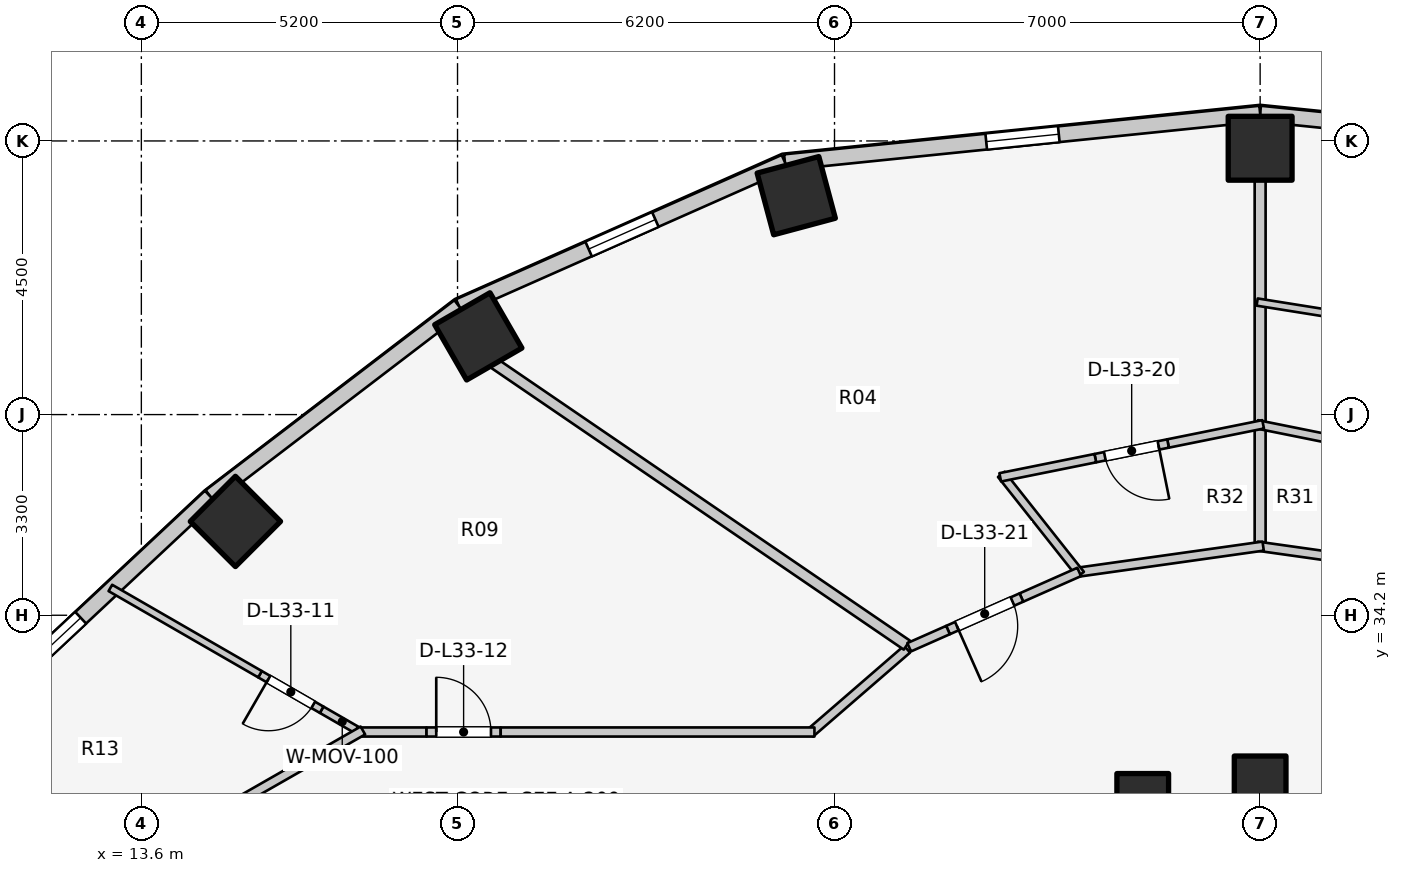
"""IFC4 building model, lengths in metres.
Left out: names, types, materials, properties, quantities, classifications, styles, units other than length and angle.
Written with IfcOpenShell. Run it as: python <this file> out.ifc"""

import sys

from ifc_helpers import new_model, si_unit, direction, frame, frame_2d, origin, origin_2d, place, context, subcontext, project, spatial, rectangle, extrude, element, fill, save


model = new_model("IFC4")
c1 = context("Model", 3, precision=1e-05, world=origin(), true_north=direction((0.0, 1.0)))
c2 = subcontext(c1, "Body", "Model", "MODEL_VIEW")
j1 = project(units=[si_unit("LENGTHUNIT", "METRE"), si_unit("PLANEANGLEUNIT", "RADIAN")], contexts=[c1])
p1 = place(None, origin())
s1 = spatial("IfcSite", under=j1, at=p1, CompositionType="ELEMENT")
p2 = place(p1, origin())
s2 = spatial("IfcBuilding", under=s1, at=p2, CompositionType="ELEMENT")
p3 = place(p2, frame((0.0, 0.0, 110.4)))
s3 = spatial("IfcBuildingStorey", under=s2, at=p3, CompositionType="ELEMENT", Elevation=110.4)
p4 = place(p3, frame((32.0, 31.46, 0.0), z_axis=(0.0, 0.0, 1.0), x_axis=(1.0, 0.0, 0.0)))
e1 = element("IfcColumn", 1, at=p4, inside=s3, PredefinedType="COLUMN", context=c2, shape_type="SweptSolid", body=[
    extrude(rectangle(XDim=0.85, YDim=0.85, at=origin_2d()), origin(), (0.0, 0.0, 1.0), 3.1),
])
p5 = place(p3, frame((32.0, 41.88, 0.0), z_axis=(0.0, 0.0, 1.0), x_axis=(0.0, 1.0, 0.0)))
e2 = element("IfcColumn", 2, at=p5, inside=s3, PredefinedType="COLUMN", context=c2, shape_type="SweptSolid", body=[
    extrude(rectangle(XDim=1.05, YDim=1.05, at=origin_2d()), origin(), (0.0, 0.0, 1.0), 3.1),
])
p6 = place(p3, frame((30.069, 31.172, 0.0), z_axis=(0.0, 0.0, 1.0), x_axis=(1.0, 0.0, 0.0)))
e3 = element("IfcColumn", 3, at=p6, inside=s3, PredefinedType="COLUMN", context=c2, shape_type="SweptSolid", body=[
    extrude(rectangle(XDim=0.85, YDim=0.85, at=origin_2d()), origin(), (0.0, 0.0, 1.0), 3.1),
])
for number, where, z_axis, x_axis in (
    (4, (24.371, 41.1, 0.0), (0.0, 0.0, 1.0), (-0.259, 0.966, 0.0)),
    (5, (19.142, 38.786, 0.0), (0.0, 0.0, 1.0), (-0.5, 0.866, 0.0)),
    (6, (15.147, 35.743, 0.0), (0.0, 0.0, 1.0), (-0.707, 0.707, 0.0)),
):
    element("IfcColumn", number, at=place(p3, frame(where, z_axis=z_axis, x_axis=x_axis)), inside=s3, PredefinedType="COLUMN", context=c2, shape_type="SweptSolid", body=[
        extrude(rectangle(XDim=1.05, YDim=1.05, at=origin_2d()), origin(), (0.0, 0.0, 1.0), 3.1),
    ])
p7 = place(p3, frame((39.816, 41.651, 0.0), z_axis=(0.0, 0.0, 1.0), x_axis=(-0.994821390558, 0.101638579726, 0.0)))
e7 = element("IfcWall", 7, at=p7, inside=s3, PredefinedType="STANDARD", context=c2, shape_type="SweptSolid", body=[
    extrude(rectangle(XDim=7.857, YDim=0.26, at=frame_2d((3.929, 0.0))), origin(), (0.0, 0.0, 1.0), 1.22),
])
p8 = place(p7, frame((3.329, 0.0, 0.15)))
e8 = element("IfcOpeningElement", 8, at=p8, cuts=e7, PredefinedType="OPENING", context=c2, shape_type="SweptSolid", body=[
    extrude(rectangle(XDim=1.2, YDim=0.9, at=frame_2d((0.6, 0.45))), frame((0.0, 0.14, 0.0), z_axis=(0.0, -1.0, 0.0), x_axis=(1.0, 0.0, 0.0)), (0.0, 0.0, 1.0), 0.28),
])
p9 = place(p3, frame((32.0, 42.449, 0.0), z_axis=(0.0, 0.0, 1.0), x_axis=(-0.994821390558, -0.101638579726, 0.0)))
e9 = element("IfcWall", 9, at=p9, inside=s3, PredefinedType="STANDARD", context=c2, shape_type="SweptSolid", body=[
    extrude(rectangle(XDim=7.857, YDim=0.26, at=frame_2d((3.929, 0.0))), origin(), (0.0, 0.0, 1.0), 1.22),
])
p10 = place(p9, frame((3.329, 0.0, 0.15)))
e10 = element("IfcOpeningElement", 10, at=p10, cuts=e9, PredefinedType="OPENING", context=c2, shape_type="SweptSolid", body=[
    extrude(rectangle(XDim=1.2, YDim=0.9, at=frame_2d((0.6, 0.45))), frame((0.0, 0.14, 0.0), z_axis=(0.0, -1.0, 0.0), x_axis=(1.0, 0.0, 0.0)), (0.0, 0.0, 1.0), 0.28),
])
p11 = place(p3, frame((24.184, 41.651, 0.0), z_axis=(0.0, 0.0, 1.0), x_axis=(-0.914336605747, -0.404955023911, 0.0)))
e11 = element("IfcWall", 11, at=p11, inside=s3, PredefinedType="STANDARD", context=c2, shape_type="SweptSolid", body=[
    extrude(rectangle(XDim=5.859, YDim=0.26, at=frame_2d((2.929, 0.0))), origin(), (0.0, 0.0, 1.0), 1.22),
])
p12 = place(p11, frame((2.329, 0.0, 0.15)))
e12 = element("IfcOpeningElement", 12, at=p12, cuts=e11, PredefinedType="OPENING", context=c2, shape_type="SweptSolid", body=[
    extrude(rectangle(XDim=1.2, YDim=0.9, at=frame_2d((0.6, 0.45))), frame((0.0, 0.14, 0.0), z_axis=(0.0, -1.0, 0.0), x_axis=(1.0, 0.0, 0.0)), (0.0, 0.0, 1.0), 0.28),
])
p13 = place(p3, frame((18.827, 39.278, 0.0), z_axis=(0.0, 0.0, 1.0), x_axis=(-0.794809810864, -0.606858603427, 0.0)))
e13 = element("IfcWall", 13, at=p13, inside=s3, PredefinedType="STANDARD", context=c2, shape_type="SweptSolid", body=[
    extrude(rectangle(XDim=5.149, YDim=0.26, at=frame_2d((2.575, 0.0))), origin(), (0.0, 0.0, 1.0), 1.22),
])
p14 = place(p3, frame((14.734, 36.153, 0.0), z_axis=(0.0, 0.0, 1.0), x_axis=(-0.730162452258, -0.68327358599, 0.0)))
e14 = element("IfcWall", 14, at=p14, inside=s3, PredefinedType="STANDARD", context=c2, shape_type="SweptSolid", body=[
    extrude(rectangle(XDim=4.868, YDim=0.26, at=frame_2d((2.434, 0.0))), origin(), (0.0, 0.0, 1.0), 1.22),
])
p15 = place(p14, frame((2.919, 0.0, 0.15)))
e15 = element("IfcOpeningElement", 15, at=p15, cuts=e14, PredefinedType="OPENING", context=c2, shape_type="SweptSolid", body=[
    extrude(rectangle(XDim=1.2, YDim=0.9, at=frame_2d((0.6, 0.45))), frame((0.0, 0.14, 0.0), z_axis=(0.0, -1.0, 0.0), x_axis=(1.0, 0.0, 0.0)), (0.0, 0.0, 1.0), 0.28),
])
p16 = place(p3, frame((17.243, 32.255, 0.0), z_axis=(0.0, 0.0, 1.0), x_axis=(-0.866356808075, 0.499425551111, 0.0)))
e16 = element("IfcWall", 16, at=p16, inside=s3, PredefinedType="MOVABLE", context=c2, shape_type="SweptSolid", body=[
    extrude(rectangle(XDim=0.783, YDim=0.12, at=frame_2d((0.392, 0.0))), origin(), (0.0, 0.0, 1.0), 2.575),
])
p17 = place(p3, frame((16.565, 32.646, 0.0), z_axis=(0.0, 0.0, 1.0), x_axis=(-0.8662585361, 0.499595985407, 0.0)))
e17 = element("IfcWall", 17, at=p17, inside=s3, PredefinedType="MOVABLE", context=c2, shape_type="SweptSolid", body=[
    extrude(rectangle(XDim=1.17, YDim=0.12, at=frame_2d((0.585, 0.0))), origin(), (0.0, 0.0, 1.0), 2.11),
])
p18 = place(p17, frame((0.16, 0.0, 0.0)))
e18 = element("IfcOpeningElement", 18, at=p18, cuts=e17, PredefinedType="OPENING", context=c2, shape_type="SweptSolid", body=[
    extrude(rectangle(XDim=0.85, YDim=2.05, at=frame_2d((0.425, 1.025))), frame((0.0, 0.07, 0.0), z_axis=(0.0, -1.0, 0.0), x_axis=(1.0, 0.0, 0.0)), (0.0, 0.0, 1.0), 0.14),
])
p19 = place(p3, frame((15.552, 33.23, 0.0), z_axis=(0.0, 0.0, 1.0), x_axis=(-0.866332910178, 0.499467004658, 0.0)))
e19 = element("IfcWall", 19, at=p19, inside=s3, PredefinedType="MOVABLE", context=c2, shape_type="SweptSolid", body=[
    extrude(rectangle(XDim=2.841, YDim=0.12, at=frame_2d((1.42, 0.0))), origin(), (0.0, 0.0, 1.0), 1.22),
])
p20 = place(p3, frame((26.193, 33.642, 0.0), z_axis=(0.0, 0.0, 1.0), x_axis=(-0.756055312247, -0.654507727092, 0.0)))
e20 = element("IfcWall", 20, at=p20, inside=s3, PredefinedType="PARTITIONING", context=c2, shape_type="SweptSolid", body=[
    extrude(rectangle(XDim=2.111, YDim=0.15, at=frame_2d((1.055, 0.0))), origin(), (0.0, 0.0, 1.0), 1.992),
])
p21 = place(p3, frame((17.15, 32.28, 0.0), z_axis=(0.0, 0.0, 1.0), x_axis=(1.0, 0.0, 0.0)))
e21 = element("IfcWall", 21, at=p21, inside=s3, PredefinedType="PARTITIONING", context=c2, shape_type="SweptSolid", body=[
    extrude(rectangle(XDim=1.14, YDim=0.15, at=frame_2d((0.57, 0.0))), origin(), (0.0, 0.0, 1.0), 2.575),
])
p22 = place(p3, frame((18.29, 32.28, 0.0), z_axis=(0.0, 0.0, 1.0), x_axis=(1.0, 0.0, 0.0)))
e22 = element("IfcWall", 22, at=p22, inside=s3, PredefinedType="PARTITIONING", context=c2, shape_type="SweptSolid", body=[
    extrude(rectangle(XDim=1.22, YDim=0.15, at=frame_2d((0.61, 0.0))), origin(), (0.0, 0.0, 1.0), 2.575),
])
p23 = place(p22, frame((0.16, 0.0, 0.0)))
e23 = element("IfcOpeningElement", 23, at=p23, cuts=e22, PredefinedType="OPENING", context=c2, shape_type="SweptSolid", body=[
    extrude(rectangle(XDim=0.9, YDim=2.1, at=frame_2d((0.45, 1.05))), frame((0.0, 0.085, 0.0), z_axis=(0.0, -1.0, 0.0), x_axis=(1.0, 0.0, 0.0)), (0.0, 0.0, 1.0), 0.17),
])
p24 = place(p3, frame((19.51, 32.28, 0.0), z_axis=(0.0, 0.0, 1.0), x_axis=(1.0, 0.0, 0.0)))
e24 = element("IfcWall", 24, at=p24, inside=s3, PredefinedType="PARTITIONING", context=c2, shape_type="SweptSolid", body=[
    extrude(rectangle(XDim=5.16, YDim=0.15, at=frame_2d((2.58, 0.0))), origin(), (0.0, 0.0, 1.0), 1.992),
])
p25 = place(p3, frame((17.243, 32.305, 0.0), z_axis=(0.0, 0.0, 1.0), x_axis=(-0.867991349648, -0.496579315857, 0.0)))
e25 = element("IfcWall", 25, at=p25, inside=s3, PredefinedType="PARTITIONING", context=c2, shape_type="SweptSolid", body=[
    extrude(rectangle(XDim=2.567, YDim=0.15, at=frame_2d((1.283, 0.0))), origin(), (0.0, 0.0, 1.0), 1.22),
])
p26 = place(p3, frame((32.0, 35.385, 0.0), z_axis=(0.0, 0.0, 1.0), x_axis=(0.0, 1.0, 0.0)))
e26 = element("IfcWall", 26, at=p26, inside=s3, PredefinedType="PARTITIONING", context=c2, shape_type="SweptSolid", body=[
    extrude(rectangle(XDim=5.99, YDim=0.18, at=frame_2d((2.995, 0.0))), origin(), (0.0, 0.0, 1.0), 1.22),
])
p27 = place(p3, frame((26.19, 33.709, 0.0), z_axis=(0.0, 0.0, 1.0), x_axis=(-0.825850521911, 0.563889098546, 0.0)))
e27 = element("IfcWall", 27, at=p27, inside=s3, PredefinedType="PARTITIONING", context=c2, shape_type="SweptSolid", body=[
    extrude(rectangle(XDim=8.228, YDim=0.18, at=frame_2d((4.114, 0.0))), origin(), (0.0, 0.0, 1.0), 1.22),
])
p28 = place(p3, frame((33.771, 39.06, 0.0), z_axis=(0.0, 0.0, 1.0), x_axis=(-0.98751575117, 0.157520288186, 0.0)))
e28 = element("IfcWall", 28, at=p28, inside=s3, PredefinedType="MOVABLE", context=c2, shape_type="SweptSolid", body=[
    extrude(rectangle(XDim=1.843, YDim=0.12, at=frame_2d((0.921, 0.0))), origin(), (0.0, 0.0, 1.0), 1.992),
])
p29 = place(p3, frame((35.034, 34.903, 0.0), z_axis=(0.0, 0.0, 1.0), x_axis=(-0.990234434447, 0.139412211929, 0.0)))
e29 = element("IfcWall", 29, at=p29, inside=s3, PredefinedType="PARTITIONING", context=c2, shape_type="SweptSolid", body=[
    extrude(rectangle(XDim=3.114, YDim=0.15, at=frame_2d((1.557, 0.0))), origin(), (0.0, 0.0, 1.0), 1.992),
])
p30 = place(p3, frame((33.515, 37.025, 0.0), z_axis=(0.0, 0.0, 1.0), x_axis=(-0.980291218326, 0.197557908657, 0.0)))
e30 = element("IfcWall", 30, at=p30, inside=s3, PredefinedType="PLUMBINGWALL", context=c2, shape_type="SweptSolid", body=[
    extrude(rectangle(XDim=1.595, YDim=0.14, at=frame_2d((0.798, 0.0))), origin(), (0.0, 0.0, 1.0), 1.992),
])
p31 = place(p3, frame((32.05, 35.337, 0.0), z_axis=(0.0, 0.0, 1.0), x_axis=(-0.990234434447, -0.139412211929, 0.0)))
e31 = element("IfcWall", 31, at=p31, inside=s3, PredefinedType="PARTITIONING", context=c2, shape_type="SweptSolid", body=[
    extrude(rectangle(XDim=3.114, YDim=0.15, at=frame_2d((1.557, 0.0))), origin(), (0.0, 0.0, 1.0), 1.992),
])
p32 = place(p3, frame((29.047, 34.871, 0.0), z_axis=(0.0, 0.0, 1.0), x_axis=(-0.620702944366, 0.784045824462, 0.0)))
e32 = element("IfcWall", 32, at=p32, inside=s3, PredefinedType="PLUMBINGWALL", context=c2, shape_type="SweptSolid", body=[
    extrude(rectangle(XDim=2.1, YDim=0.14, at=frame_2d((1.05, 0.0))), origin(), (0.0, 0.0, 1.0), 2.105),
])
p33 = place(p3, frame((32.049, 37.34, 0.0), z_axis=(0.0, 0.0, 1.0), x_axis=(-0.980291218326, -0.197557908657, 0.0)))
e33 = element("IfcWall", 33, at=p33, inside=s3, PredefinedType="PLUMBINGWALL", context=c2, shape_type="SweptSolid", body=[
    extrude(rectangle(XDim=1.595, YDim=0.14, at=frame_2d((0.798, 0.0))), origin(), (0.0, 0.0, 1.0), 1.992),
])
p34 = place(p3, frame((30.485, 37.025, 0.0), z_axis=(0.0, 0.0, 1.0), x_axis=(-0.980256050043, -0.197732335125, 0.0)))
e34 = element("IfcWall", 34, at=p34, inside=s3, PredefinedType="PLUMBINGWALL", context=c2, shape_type="SweptSolid", body=[
    extrude(rectangle(XDim=1.22, YDim=0.14, at=frame_2d((0.61, 0.0))), origin(), (0.0, 0.0, 1.0), 2.575),
])
p35 = place(p34, frame((0.16, 0.0, 0.0)))
e35 = element("IfcOpeningElement", 35, at=p35, cuts=e34, PredefinedType="OPENING", context=c2, shape_type="SweptSolid", body=[
    extrude(rectangle(XDim=0.9, YDim=2.1, at=frame_2d((0.45, 1.05))), frame((0.0, 0.08, 0.0), z_axis=(0.0, -1.0, 0.0), x_axis=(1.0, 0.0, 0.0)), (0.0, 0.0, 1.0), 0.16),
])
p36 = place(p3, frame((29.289, 36.783, 0.0), z_axis=(0.0, 0.0, 1.0), x_axis=(-0.980261572321, -0.197704956516, 0.0)))
e36 = element("IfcWall", 36, at=p36, inside=s3, PredefinedType="PLUMBINGWALL", context=c2, shape_type="SweptSolid", body=[
    extrude(rectangle(XDim=1.595, YDim=0.14, at=frame_2d((0.798, 0.0))), origin(), (0.0, 0.0, 1.0), 2.575),
])
p37 = place(p3, frame((29.024, 34.912, 0.0), z_axis=(0.0, 0.0, 1.0), x_axis=(-0.914314594958, -0.405004717808, 0.0)))
e37 = element("IfcWall", 37, at=p37, inside=s3, PredefinedType="PARTITIONING", context=c2, shape_type="SweptSolid", body=[
    extrude(rectangle(XDim=1.039, YDim=0.15, at=frame_2d((0.52, 0.0))), origin(), (0.0, 0.0, 1.0), 1.992),
])
p38 = place(p3, frame((28.073, 34.491, 0.0), z_axis=(0.0, 0.0, 1.0), x_axis=(-0.914314172667, -0.405005671145, 0.0)))
e38 = element("IfcWall", 38, at=p38, inside=s3, PredefinedType="PARTITIONING", context=c2, shape_type="SweptSolid", body=[
    extrude(rectangle(XDim=1.32, YDim=0.15, at=frame_2d((0.66, 0.0))), origin(), (0.0, 0.0, 1.0), 2.16),
])
p39 = place(p38, frame((0.16, 0.0, 0.0)))
e39 = element("IfcOpeningElement", 39, at=p39, cuts=e38, PredefinedType="OPENING", context=c2, shape_type="SweptSolid", body=[
    extrude(rectangle(XDim=1.0, YDim=2.1, at=frame_2d((0.5, 1.05))), frame((0.0, 0.085, 0.0), z_axis=(0.0, -1.0, 0.0), x_axis=(1.0, 0.0, 0.0)), (0.0, 0.0, 1.0), 0.17),
])
p40 = place(p3, frame((26.866, 33.957, 0.0), z_axis=(0.0, 0.0, 1.0), x_axis=(-0.914358636493, -0.404905277652, 0.0)))
e40 = element("IfcWall", 40, at=p40, inside=s3, PredefinedType="PARTITIONING", context=c2, shape_type="SweptSolid", body=[
    extrude(rectangle(XDim=0.698, YDim=0.15, at=frame_2d((0.349, 0.0))), origin(), (0.0, 0.0, 1.0), 2.575),
])
p41 = place(p10, origin())
e41 = element("IfcWindow", 41, at=p41, inside=s3, PartitioningType="SINGLE_PANEL", PredefinedType="WINDOW", context=c2, shape_type="SweptSolid", body=[
    extrude(rectangle(XDim=1.2, YDim=0.9, at=frame_2d((0.6, 0.45))), frame((0.0, 0.03, 0.0), z_axis=(0.0, -1.0, 0.0), x_axis=(1.0, 0.0, 0.0)), (0.0, 0.0, 1.0), 0.06),
])
fill(e10, e41)
p42 = place(p12, origin())
e42 = element("IfcWindow", 42, at=p42, inside=s3, PartitioningType="SINGLE_PANEL", PredefinedType="WINDOW", context=c2, shape_type="SweptSolid", body=[
    extrude(rectangle(XDim=1.2, YDim=0.9, at=frame_2d((0.6, 0.45))), frame((0.0, 0.03, 0.0), z_axis=(0.0, -1.0, 0.0), x_axis=(1.0, 0.0, 0.0)), (0.0, 0.0, 1.0), 0.06),
])
fill(e12, e42)
p43 = place(p15, origin())
e43 = element("IfcWindow", 43, at=p43, inside=s3, PartitioningType="SINGLE_PANEL", PredefinedType="WINDOW", context=c2, shape_type="SweptSolid", body=[
    extrude(rectangle(XDim=1.2, YDim=0.9, at=frame_2d((0.6, 0.45))), frame((0.0, 0.03, 0.0), z_axis=(0.0, -1.0, 0.0), x_axis=(1.0, 0.0, 0.0)), (0.0, 0.0, 1.0), 0.06),
])
fill(e15, e43)
p44 = place(p18, origin())
e44 = element("IfcDoor", 44, at=p44, inside=s3, OperationType="SINGLE_SWING_RIGHT", PredefinedType="DOOR", context=c2, shape_type="SweptSolid", body=[
    extrude(rectangle(XDim=0.85, YDim=2.05, at=frame_2d((0.425, 1.025))), frame((0.0, 0.025, 0.0), z_axis=(0.0, -1.0, 0.0), x_axis=(1.0, 0.0, 0.0)), (0.0, 0.0, 1.0), 0.05),
])
fill(e18, e44)
p45 = place(p23, origin())
e45 = element("IfcDoor", 45, at=p45, inside=s3, OperationType="SINGLE_SWING_LEFT", PredefinedType="DOOR", context=c2, shape_type="SweptSolid", body=[
    extrude(rectangle(XDim=0.9, YDim=2.1, at=frame_2d((0.45, 1.05))), frame((0.0, 0.025, 0.0), z_axis=(0.0, -1.0, 0.0), x_axis=(1.0, 0.0, 0.0)), (0.0, 0.0, 1.0), 0.05),
])
fill(e23, e45)
p46 = place(p35, origin())
e46 = element("IfcDoor", 46, at=p46, inside=s3, OperationType="SINGLE_SWING_LEFT", PredefinedType="DOOR", context=c2, shape_type="SweptSolid", body=[
    extrude(rectangle(XDim=0.9, YDim=2.1, at=frame_2d((0.45, 1.05))), frame((0.0, 0.025, 0.0), z_axis=(0.0, -1.0, 0.0), x_axis=(1.0, 0.0, 0.0)), (0.0, 0.0, 1.0), 0.05),
])
fill(e35, e46)
p47 = place(p39, origin())
e47 = element("IfcDoor", 47, at=p47, inside=s3, OperationType="SINGLE_SWING_RIGHT", PredefinedType="DOOR", context=c2, shape_type="SweptSolid", body=[
    extrude(rectangle(XDim=1.0, YDim=2.1, at=frame_2d((0.5, 1.05))), frame((0.0, 0.025, 0.0), z_axis=(0.0, -1.0, 0.0), x_axis=(1.0, 0.0, 0.0)), (0.0, 0.0, 1.0), 0.05),
])
fill(e39, e47)
save(model, sys.argv[1])
